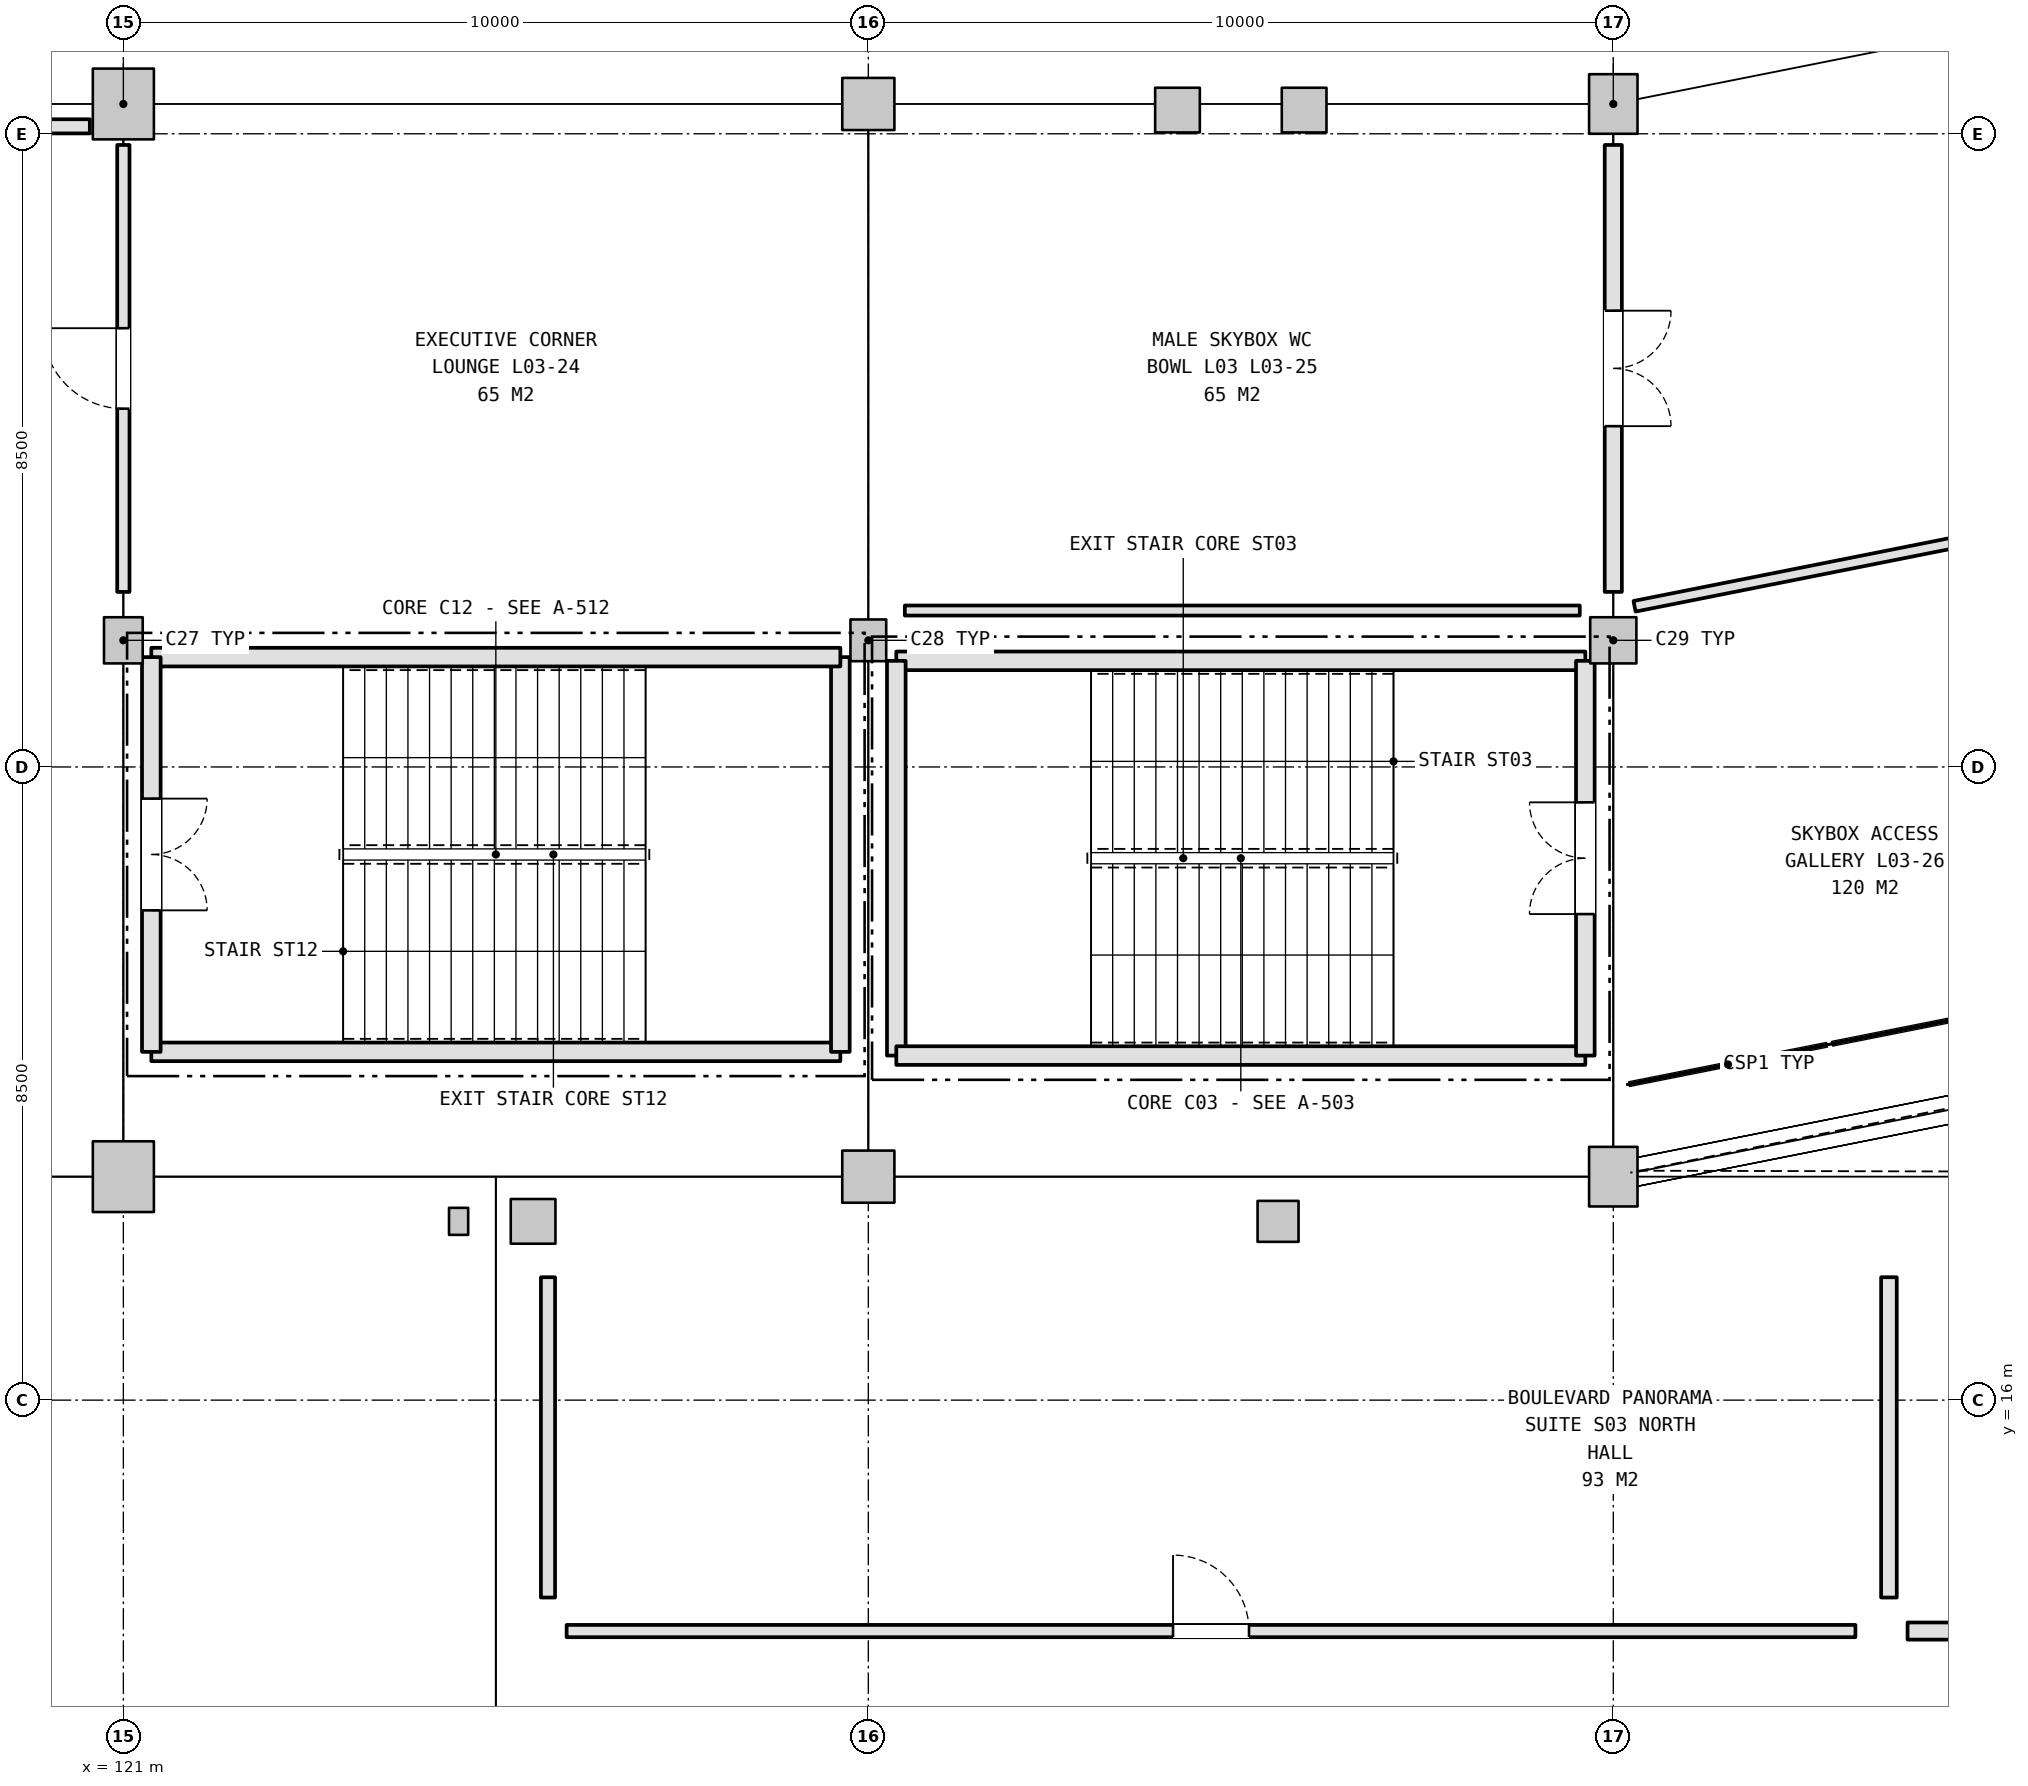
"""IFC4 building model, lengths in metres.
Left out: names, types, materials, properties, quantities, classifications, styles, units other than length and angle.
Written with IfcOpenShell. Run it as: python <this file> out.ifc"""

import sys

from ifc_helpers import new_model, si_unit, direction, frame, frame_2d, origin, origin_2d, place, context, subcontext, project, spatial, rectangle, i_section, extrude, element, fill, save


model = new_model("IFC4")
c1 = context("Model", 3, precision=1e-05, world=origin(), true_north=direction((0.0, 1.0)))
c2 = subcontext(c1, "Body", "Model", "MODEL_VIEW")
j1 = project(units=[si_unit("LENGTHUNIT", "METRE"), si_unit("PLANEANGLEUNIT", "RADIAN")], contexts=[c1])
p1 = place(None, origin())
s1 = spatial("IfcSite", under=j1, at=p1, CompositionType="ELEMENT")
p2 = place(p1, origin())
s2 = spatial("IfcBuilding", under=s1, at=p2, CompositionType="ELEMENT")
p3 = place(p2, frame((0.0, 0.0, 16.2)))
s3 = spatial("IfcBuildingStorey", under=s2, at=p3, CompositionType="ELEMENT", Elevation=16.2)
p4 = place(p3, frame((121.0, 33.4, 0.0), z_axis=(0.0, 0.0, 1.0), x_axis=(1.0, 0.0, 0.0)))
e1 = element("IfcColumn", 1, at=p4, inside=s3, PredefinedType="COLUMN", context=c2, shape_type="SweptSolid", body=[
    extrude(rectangle(XDim=0.82, YDim=0.95, at=origin_2d()), origin(), (0.0, 0.0, 1.0), 5.4),
])
p5 = place(p3, frame((121.0, 26.2, 0.0), z_axis=(0.0, 0.0, 1.0), x_axis=(1.0, 0.0, 0.0)))
e2 = element("IfcColumn", 2, at=p5, inside=s3, PredefinedType="COLUMN", context=c2, shape_type="SweptSolid", body=[
    extrude(rectangle(XDim=0.52, YDim=0.62, at=origin_2d()), origin(), (0.0, 0.0, 1.0), 5.4),
])
p6 = place(p3, frame((121.0, 19.0, 0.0), z_axis=(0.0, 0.0, 1.0), x_axis=(1.0, 0.0, 0.0)))
e3 = element("IfcColumn", 3, at=p6, inside=s3, PredefinedType="COLUMN", context=c2, shape_type="SweptSolid", body=[
    extrude(rectangle(XDim=0.82, YDim=0.95, at=origin_2d()), origin(), (0.0, 0.0, 1.0), 5.4),
])
p7 = place(p3, frame((131.0, 33.4, 0.0), z_axis=(0.0, 0.0, 1.0), x_axis=(1.0, 0.0, 0.0)))
e4 = element("IfcColumn", 4, at=p7, inside=s3, PredefinedType="COLUMN", context=c2, shape_type="SweptSolid", body=[
    extrude(rectangle(XDim=0.7, YDim=0.7, at=origin_2d()), origin(), (0.0, 0.0, 1.0), 5.4),
])
p8 = place(p3, frame((131.0, 26.2, 0.0), z_axis=(0.0, 0.0, 1.0), x_axis=(1.0, 0.0, 0.0)))
e5 = element("IfcColumn", 5, at=p8, inside=s3, PredefinedType="COLUMN", context=c2, shape_type="SweptSolid", body=[
    extrude(rectangle(XDim=0.48, YDim=0.56, at=origin_2d()), origin(), (0.0, 0.0, 1.0), 5.4),
])
p9 = place(p3, frame((131.0, 19.0, 0.0), z_axis=(0.0, 0.0, 1.0), x_axis=(1.0, 0.0, 0.0)))
e6 = element("IfcColumn", 6, at=p9, inside=s3, PredefinedType="COLUMN", context=c2, shape_type="SweptSolid", body=[
    extrude(rectangle(XDim=0.7, YDim=0.7, at=origin_2d()), origin(), (0.0, 0.0, 1.0), 5.4),
])
p10 = place(p3, frame((141.0, 33.4, 0.0), z_axis=(0.0, 0.0, 1.0), x_axis=(1.0, 0.0, 0.0)))
e7 = element("IfcColumn", 7, at=p10, inside=s3, PredefinedType="COLUMN", context=c2, shape_type="SweptSolid", body=[
    extrude(rectangle(XDim=0.65, YDim=0.8, at=origin_2d()), origin(), (0.0, 0.0, 1.0), 5.4),
])
p11 = place(p3, frame((141.0, 26.2, 0.0), z_axis=(0.0, 0.0, 1.0), x_axis=(1.0, 0.0, 0.0)))
e8 = element("IfcColumn", 8, at=p11, inside=s3, PredefinedType="COLUMN", context=c2, shape_type="SweptSolid", body=[
    extrude(rectangle(XDim=0.62, YDim=0.62, at=origin_2d()), origin(), (0.0, 0.0, 1.0), 5.4),
])
p12 = place(p3, frame((141.0, 19.0, 0.0), z_axis=(0.0, 0.0, 1.0), x_axis=(1.0, 0.0, 0.0)))
e9 = element("IfcColumn", 9, at=p12, inside=s3, PredefinedType="COLUMN", context=c2, shape_type="SweptSolid", body=[
    extrude(rectangle(XDim=0.65, YDim=0.8, at=origin_2d()), origin(), (0.0, 0.0, 1.0), 5.4),
])
p13 = place(p3, frame((126.5, 18.4, 0.0), z_axis=(0.0, 0.0, 1.0), x_axis=(1.0, 0.0, 0.0)))
e10 = element("IfcColumn", 10, at=p13, inside=s3, PredefinedType="COLUMN", context=c2, shape_type="SweptSolid", body=[
    extrude(rectangle(XDim=0.6, YDim=0.6, at=origin_2d()), origin(), (0.0, 0.0, 1.0), 5.4),
])
p14 = place(p3, frame((136.5, 18.4, 0.0), z_axis=(0.0, 0.0, 1.0), x_axis=(1.0, 0.0, 0.0)))
e11 = element("IfcColumn", 11, at=p14, inside=s3, PredefinedType="COLUMN", context=c2, shape_type="SweptSolid", body=[
    extrude(rectangle(XDim=0.55, YDim=0.55, at=origin_2d()), origin(), (0.0, 0.0, 1.0), 5.4),
])
p15 = place(p3, frame((125.5, 18.4, 0.0), z_axis=(0.0, 0.0, 1.0), x_axis=(1.0, 0.0, 0.0)))
e12 = element("IfcColumn", 12, at=p15, inside=s3, PredefinedType="COLUMN", context=c2, shape_type="SweptSolid", body=[
    extrude(i_section(OverallWidth=0.257, OverallDepth=0.363, WebThickness=0.013, FlangeThickness=0.022, FilletRadius=0.015, at=origin_2d()), origin(), (0.0, 0.0, 1.0), 5.4),
])
p16 = place(p3, frame((140.625, 25.925, 0.0), z_axis=(0.0, 0.0, 1.0), x_axis=(-1.0, 0.0, 0.0)))
e13 = element("IfcWall", 13, at=p16, inside=s3, PredefinedType="SHEAR", context=c2, shape_type="SweptSolid", body=[
    extrude(rectangle(XDim=9.249, YDim=0.25, at=frame_2d((4.625, 0.0))), origin(), (0.0, 0.0, 1.0), 5.14),
])
p17 = place(p3, frame((131.375, 25.925, 0.0), z_axis=(0.0, 0.0, 1.0), x_axis=(0.0, -1.0, 0.0)))
e14 = element("IfcWall", 14, at=p17, inside=s3, PredefinedType="SHEAR", context=c2, shape_type="SweptSolid", body=[
    extrude(rectangle(XDim=5.299, YDim=0.25, at=frame_2d((2.649, 0.0))), origin(), (0.0, 0.0, 1.0), 5.14),
])
p18 = place(p3, frame((131.375, 20.625, 0.0), z_axis=(0.0, 0.0, 1.0), x_axis=(1.0, 0.0, 0.0)))
e15 = element("IfcWall", 15, at=p18, inside=s3, PredefinedType="SHEAR", context=c2, shape_type="SweptSolid", body=[
    extrude(rectangle(XDim=9.249, YDim=0.25, at=frame_2d((4.625, 0.0))), origin(), (0.0, 0.0, 1.0), 5.14),
])
p19 = place(p3, frame((140.625, 20.625, 0.0), z_axis=(0.0, 0.0, 1.0), x_axis=(0.0, 1.0, 0.0)))
e16 = element("IfcWall", 16, at=p19, inside=s3, PredefinedType="SHEAR", context=c2, shape_type="SweptSolid", body=[
    extrude(rectangle(XDim=5.299, YDim=0.25, at=frame_2d((2.649, 0.0))), origin(), (0.0, 0.0, 1.0), 5.14),
])
p20 = place(p19, frame((1.9, 0.0, 0.0)))
e17 = element("IfcOpeningElement", 17, at=p20, cuts=e16, PredefinedType="OPENING", context=c2, shape_type="SweptSolid", body=[
    extrude(rectangle(XDim=1.5, YDim=2.2, at=frame_2d((0.75, 1.1))), frame((0.0, 0.135, 0.0), z_axis=(0.0, -1.0, 0.0), x_axis=(1.0, 0.0, 0.0)), (0.0, 0.0, 1.0), 0.27),
])
p21 = place(p3, frame((121.375, 20.675, 0.0), z_axis=(0.0, 0.0, 1.0), x_axis=(1.0, 0.0, 0.0)))
e18 = element("IfcWall", 18, at=p21, inside=s3, PredefinedType="SHEAR", context=c2, shape_type="SweptSolid", body=[
    extrude(rectangle(XDim=9.249, YDim=0.25, at=frame_2d((4.625, 0.0))), origin(), (0.0, 0.0, 1.0), 5.14),
])
p22 = place(p3, frame((130.625, 20.675, 0.0), z_axis=(0.0, 0.0, 1.0), x_axis=(0.0, 1.0, 0.0)))
e19 = element("IfcWall", 19, at=p22, inside=s3, PredefinedType="SHEAR", context=c2, shape_type="SweptSolid", body=[
    extrude(rectangle(XDim=5.299, YDim=0.25, at=frame_2d((2.65, 0.0))), origin(), (0.0, 0.0, 1.0), 5.14),
])
p23 = place(p3, frame((130.625, 25.975, 0.0), z_axis=(0.0, 0.0, 1.0), x_axis=(-1.0, 0.0, 0.0)))
e20 = element("IfcWall", 20, at=p23, inside=s3, PredefinedType="SHEAR", context=c2, shape_type="SweptSolid", body=[
    extrude(rectangle(XDim=9.249, YDim=0.25, at=frame_2d((4.625, 0.0))), origin(), (0.0, 0.0, 1.0), 5.14),
])
p24 = place(p3, frame((121.375, 25.975, 0.0), z_axis=(0.0, 0.0, 1.0), x_axis=(0.0, -1.0, 0.0)))
e21 = element("IfcWall", 21, at=p24, inside=s3, PredefinedType="SHEAR", context=c2, shape_type="SweptSolid", body=[
    extrude(rectangle(XDim=5.299, YDim=0.25, at=frame_2d((2.65, 0.0))), origin(), (0.0, 0.0, 1.0), 5.14),
])
p25 = place(p24, frame((1.9, 0.0, 0.0)))
e22 = element("IfcOpeningElement", 22, at=p25, cuts=e21, PredefinedType="OPENING", context=c2, shape_type="SweptSolid", body=[
    extrude(rectangle(XDim=1.5, YDim=2.2, at=frame_2d((0.75, 1.1))), frame((0.0, 0.135, 0.0), z_axis=(0.0, -1.0, 0.0), x_axis=(1.0, 0.0, 0.0)), (0.0, 0.0, 1.0), 0.27),
])
for number, where, z_axis, x_axis in (
    (23, (136.85, 33.318, 0.0), (0.0, 0.0, 1.0), (1.0, 0.0, 0.0)),
    (24, (135.15, 33.318, 0.0), (0.0, 0.0, 1.0), (1.0, 0.0, 0.0)),
):
    element("IfcColumn", number, at=place(p3, frame(where, z_axis=z_axis, x_axis=x_axis)), inside=s3, PredefinedType="COLUMN", context=c2, shape_type="SweptSolid", body=[
        extrude(rectangle(XDim=0.6, YDim=0.6, at=origin_2d()), origin(), (0.0, 0.0, 1.0), 5.4),
    ])
p26 = place(p3, frame((144.25, 12.9, 0.0), z_axis=(0.0, 0.0, 1.0), x_axis=(-1.0, 0.0, 0.0)))
e25 = element("IfcWall", 25, at=p26, inside=s3, PredefinedType="PARTITIONING", context=c2, shape_type="SweptSolid", body=[
    extrude(rectangle(XDim=17.3, YDim=0.165, at=frame_2d((8.65, 0.0))), origin(), (0.0, 0.0, 1.0), 4.405),
])
p27 = place(p26, frame((8.14, 0.0, 0.0)))
e26 = element("IfcOpeningElement", 26, at=p27, cuts=e25, PredefinedType="OPENING", context=c2, shape_type="SweptSolid", body=[
    extrude(rectangle(XDim=1.02, YDim=2.15, at=frame_2d((0.51, 1.075))), frame((0.0, 0.093, 0.0), z_axis=(0.0, -1.0, 0.0), x_axis=(1.0, 0.0, 0.0)), (0.0, 0.0, 1.0), 0.185),
])
p28 = place(p3, frame((126.7, 13.35, 0.0), z_axis=(0.0, 0.0, 1.0), x_axis=(0.0, 1.0, 0.0)))
e27 = element("IfcWall", 27, at=p28, inside=s3, PredefinedType="PARTITIONING", context=c2, shape_type="SweptSolid", body=[
    extrude(rectangle(XDim=4.3, YDim=0.19, at=frame_2d((2.15, 0.0))), origin(), (0.0, 0.0, 1.0), 4.455),
])
p29 = place(p3, frame((162.25, 12.9, 0.0), z_axis=(0.0, 0.0, 1.0), x_axis=(-1.0, 0.0, 0.0)))
e28 = element("IfcWall", 28, at=p29, inside=s3, PredefinedType="PLUMBINGWALL", context=c2, shape_type="SweptSolid", body=[
    extrude(rectangle(XDim=17.3, YDim=0.23, at=frame_2d((8.65, 0.0))), origin(), (0.0, 0.0, 1.0), 4.405),
])
p30 = place(p29, frame((8.15, 0.0, 0.0)))
e29 = element("IfcOpeningElement", 29, at=p30, cuts=e28, PredefinedType="OPENING", context=c2, shape_type="SweptSolid", body=[
    extrude(rectangle(XDim=1.0, YDim=2.15, at=frame_2d((0.5, 1.075))), frame((0.0, 0.125, 0.0), z_axis=(0.0, -1.0, 0.0), x_axis=(1.0, 0.0, 0.0)), (0.0, 0.0, 1.0), 0.25),
])
p31 = place(p3, frame((144.7, 13.35, 0.0), z_axis=(0.0, 0.0, 1.0), x_axis=(0.0, 1.0, 0.0)))
e30 = element("IfcWall", 30, at=p31, inside=s3, PredefinedType="PLUMBINGWALL", context=c2, shape_type="SweptSolid", body=[
    extrude(rectangle(XDim=4.3, YDim=0.21, at=frame_2d((2.15, 0.0))), origin(), (0.0, 0.0, 1.0), 4.605),
])
p32 = place(p3, frame((121.0, 32.85, 0.0), z_axis=(0.0, 0.0, 1.0), x_axis=(0.0, -1.0, 0.0)))
e31 = element("IfcWall", 31, at=p32, inside=s3, PredefinedType="PARTITIONING", context=c2, shape_type="SweptSolid", body=[
    extrude(rectangle(XDim=6.0, YDim=0.165, at=frame_2d((3.0, 0.0))), origin(), (0.0, 0.0, 1.0), 4.365),
])
p33 = place(p32, frame((2.46, 0.0, 0.0)))
e32 = element("IfcOpeningElement", 32, at=p33, cuts=e31, PredefinedType="OPENING", context=c2, shape_type="SweptSolid", body=[
    extrude(rectangle(XDim=1.08, YDim=2.25, at=frame_2d((0.54, 1.125))), frame((0.0, 0.093, 0.0), z_axis=(0.0, -1.0, 0.0), x_axis=(1.0, 0.0, 0.0)), (0.0, 0.0, 1.0), 0.185),
])
p34 = place(p3, frame((111.49, 33.1, 0.0), z_axis=(0.0, 0.0, 1.0), x_axis=(1.0, 0.0, 0.0)))
e33 = element("IfcWall", 33, at=p34, inside=s3, PredefinedType="PARTITIONING", context=c2, shape_type="SweptSolid", body=[
    extrude(rectangle(XDim=9.06, YDim=0.19, at=frame_2d((4.53, 0.0))), origin(), (0.0, 0.0, 1.0), 4.505),
])
p35 = place(p3, frame((141.0, 32.85, 0.0), z_axis=(0.0, 0.0, 1.0), x_axis=(0.0, -1.0, 0.0)))
e34 = element("IfcWall", 34, at=p35, inside=s3, PredefinedType="PLUMBINGWALL", context=c2, shape_type="SweptSolid", body=[
    extrude(rectangle(XDim=6.0, YDim=0.23, at=frame_2d((3.0, 0.0))), origin(), (0.0, 0.0, 1.0), 4.305),
])
p36 = place(p35, frame((2.225, 0.0, 0.0)))
e35 = element("IfcOpeningElement", 35, at=p36, cuts=e34, PredefinedType="OPENING", context=c2, shape_type="SweptSolid", body=[
    extrude(rectangle(XDim=1.55, YDim=2.15, at=frame_2d((0.775, 1.075))), frame((0.0, 0.125, 0.0), z_axis=(0.0, -1.0, 0.0), x_axis=(1.0, 0.0, 0.0)), (0.0, 0.0, 1.0), 0.25),
])
p37 = place(p3, frame((140.55, 26.6, 0.0), z_axis=(0.0, 0.0, 1.0), x_axis=(-1.0, 0.0, 0.0)))
e36 = element("IfcWall", 36, at=p37, inside=s3, PredefinedType="PARTITIONING", context=c2, shape_type="SweptSolid", body=[
    extrude(rectangle(XDim=9.06, YDim=0.135, at=frame_2d((4.53, 0.0))), origin(), (0.0, 0.0, 1.0), 5.12),
])
p38 = place(p3, frame((157.746, 29.931, 0.0), z_axis=(0.0, 0.0, 1.0), x_axis=(-0.980786027867, -0.195086564225, 0.0)))
e37 = element("IfcWall", 37, at=p38, inside=s3, PredefinedType="PARTITIONING", context=c2, shape_type="SweptSolid", body=[
    extrude(rectangle(XDim=16.783, YDim=0.145, at=frame_2d((8.392, 0.0))), origin(), (0.0, 0.0, 1.0), 4.305),
])
p39 = place(p38, frame((7.832, 0.0, 0.0)))
e38 = element("IfcOpeningElement", 38, at=p39, cuts=e37, PredefinedType="OPENING", context=c2, shape_type="SweptSolid", body=[
    extrude(rectangle(XDim=1.12, YDim=2.2, at=frame_2d((0.56, 1.1))), frame((0.0, 0.083, 0.0), z_axis=(0.0, -1.0, 0.0), x_axis=(1.0, 0.0, 0.0)), (0.0, 0.0, 1.0), 0.165),
])
p40 = place(p20, origin())
e39 = element("IfcDoor", 39, at=p40, inside=s3, OperationType="DOUBLE_DOOR_SINGLE_SWING", PredefinedType="DOOR", context=c2, shape_type="SweptSolid", body=[
    extrude(rectangle(XDim=1.5, YDim=2.2, at=frame_2d((0.75, 1.1))), frame((0.0, 0.025, 0.0), z_axis=(0.0, -1.0, 0.0), x_axis=(1.0, 0.0, 0.0)), (0.0, 0.0, 1.0), 0.05),
])
fill(e17, e39)
p41 = place(p25, origin())
e40 = element("IfcDoor", 40, at=p41, inside=s3, OperationType="DOUBLE_DOOR_SINGLE_SWING", PredefinedType="DOOR", context=c2, shape_type="SweptSolid", body=[
    extrude(rectangle(XDim=1.5, YDim=2.2, at=frame_2d((0.75, 1.1))), frame((0.0, 0.025, 0.0), z_axis=(0.0, -1.0, 0.0), x_axis=(1.0, 0.0, 0.0)), (0.0, 0.0, 1.0), 0.05),
])
fill(e22, e40)
p42 = place(p27, frame((1.02, 0.0, 0.0), z_axis=(0.0, 0.0, 1.0), x_axis=(-1.0, 0.0, 0.0)))
e41 = element("IfcDoor", 41, at=p42, inside=s3, OperationType="SINGLE_SWING_RIGHT", PredefinedType="DOOR", context=c2, shape_type="SweptSolid", body=[
    extrude(rectangle(XDim=1.02, YDim=2.15, at=frame_2d((0.51, 1.075))), frame((0.0, 0.025, 0.0), z_axis=(0.0, -1.0, 0.0), x_axis=(1.0, 0.0, 0.0)), (0.0, 0.0, 1.0), 0.05),
])
fill(e26, e41)
p43 = place(p33, frame((1.08, 0.0, 0.0), z_axis=(0.0, 0.0, 1.0), x_axis=(-1.0, 0.0, 0.0)))
e42 = element("IfcDoor", 42, at=p43, inside=s3, OperationType="SINGLE_SWING_LEFT", PredefinedType="DOOR", context=c2, shape_type="SweptSolid", body=[
    extrude(rectangle(XDim=1.08, YDim=2.25, at=frame_2d((0.54, 1.125))), frame((0.0, 0.025, 0.0), z_axis=(0.0, -1.0, 0.0), x_axis=(1.0, 0.0, 0.0)), (0.0, 0.0, 1.0), 0.05),
])
fill(e32, e42)
p44 = place(p36, origin())
e43 = element("IfcDoor", 43, at=p44, inside=s3, OperationType="DOUBLE_DOOR_SINGLE_SWING", PredefinedType="DOOR", context=c2, shape_type="SweptSolid", body=[
    extrude(rectangle(XDim=1.55, YDim=2.15, at=frame_2d((0.775, 1.075))), frame((0.0, 0.025, 0.0), z_axis=(0.0, -1.0, 0.0), x_axis=(1.0, 0.0, 0.0)), (0.0, 0.0, 1.0), 0.05),
])
fill(e35, e43)
save(model, sys.argv[1])
